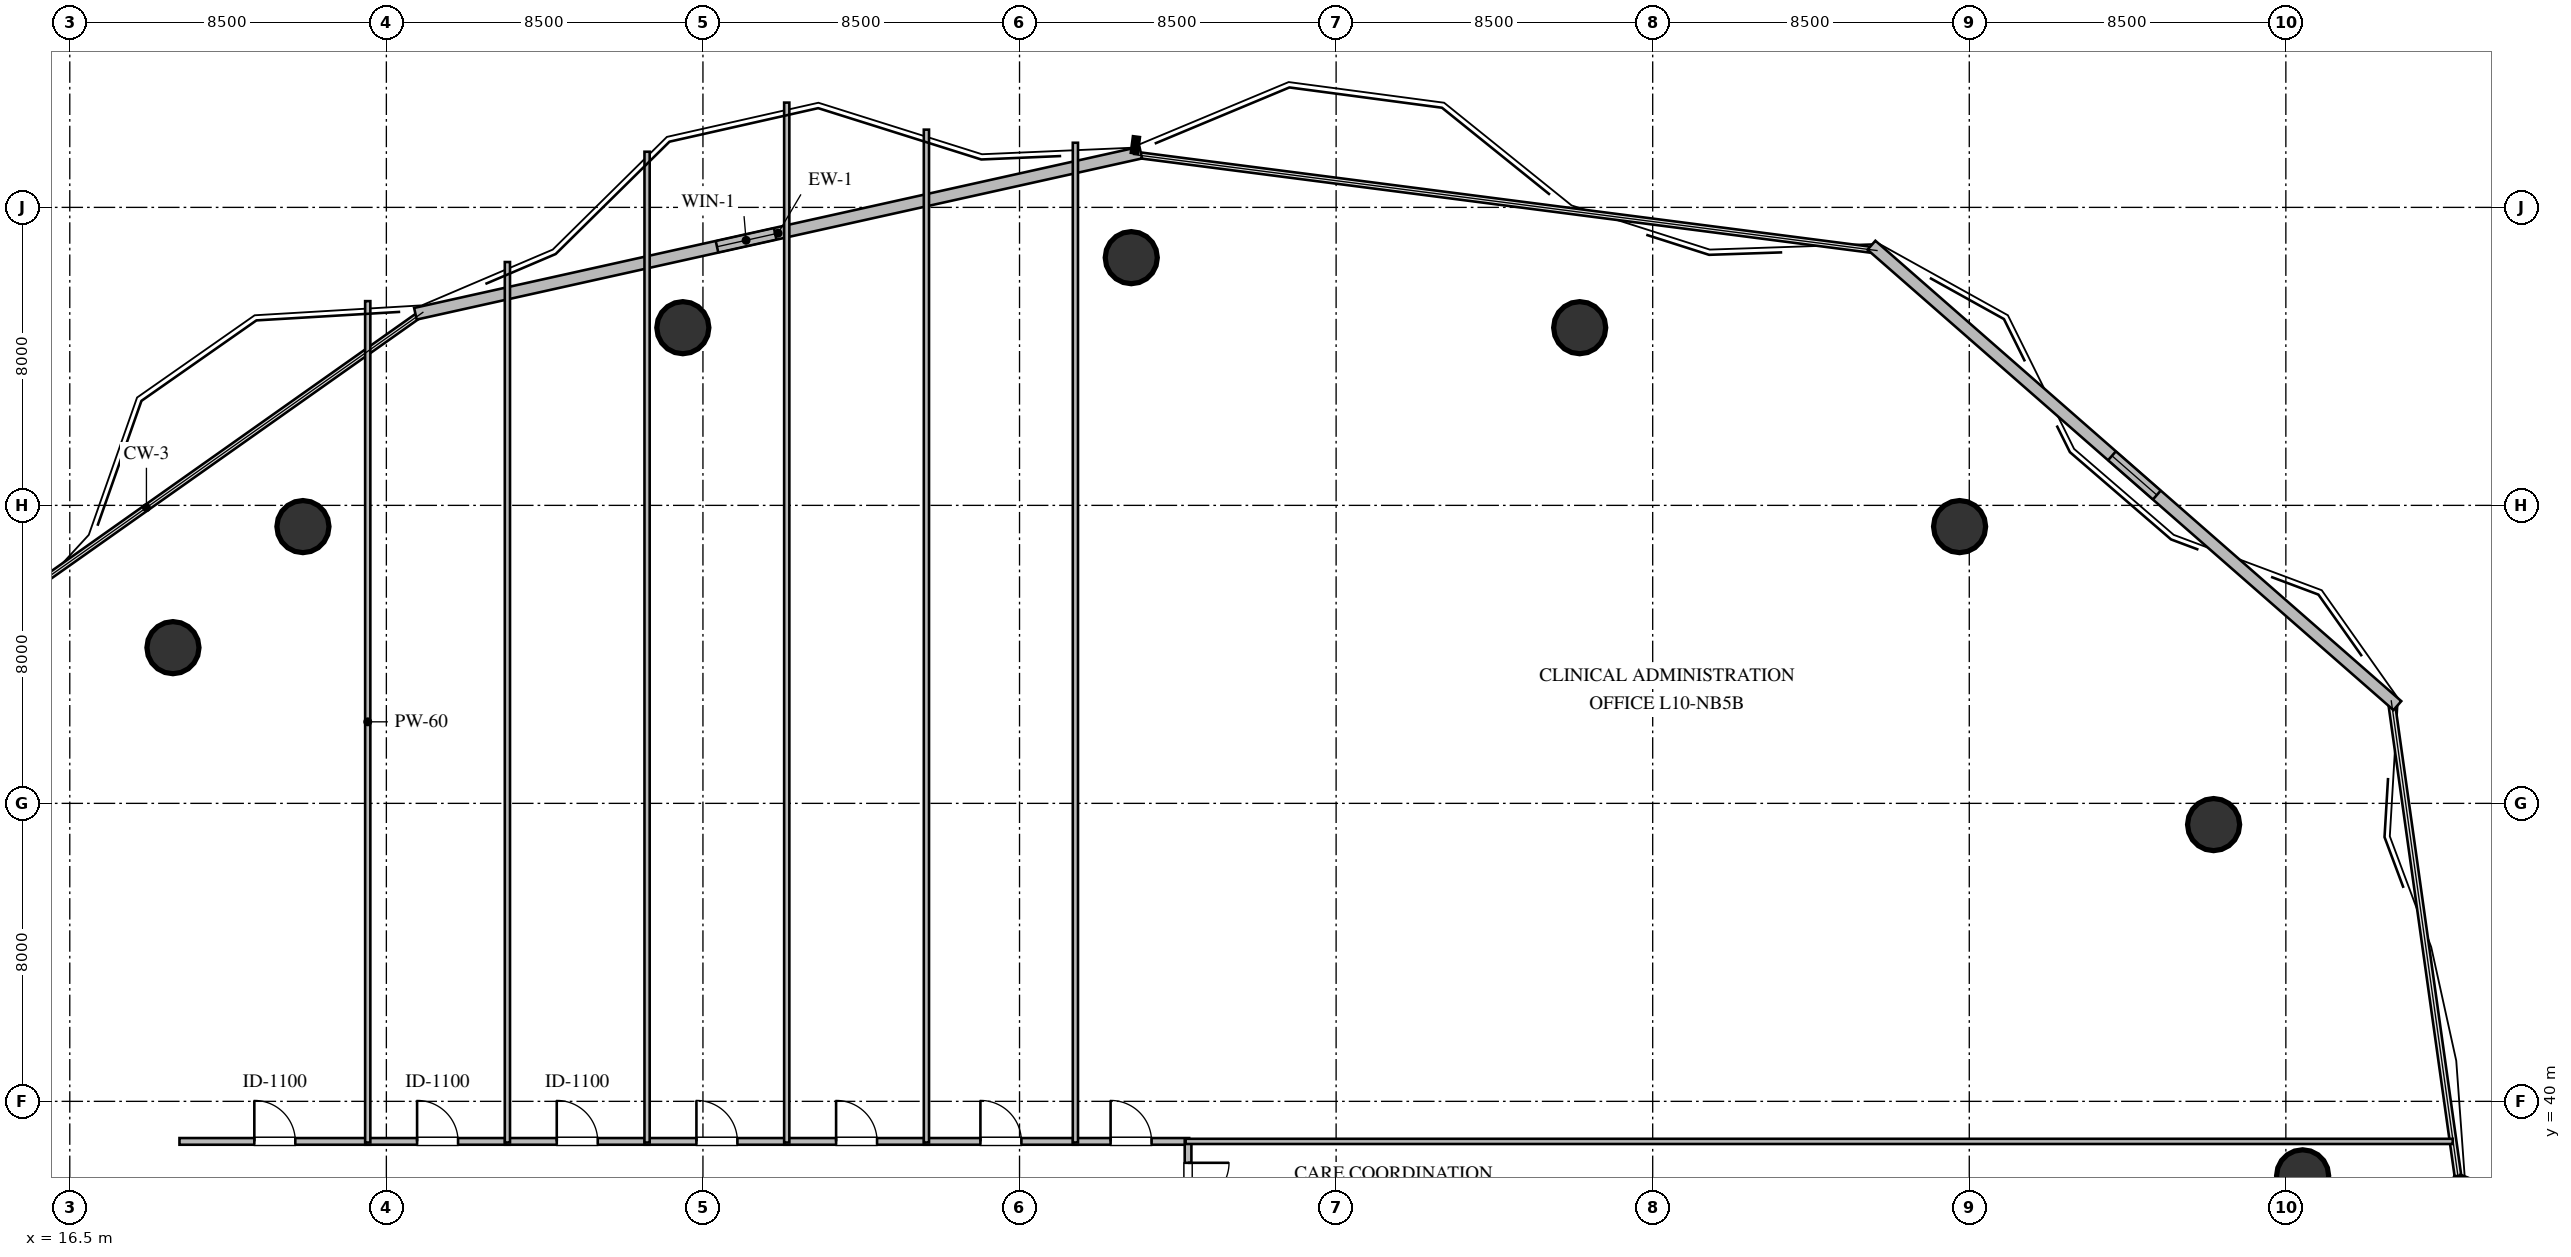
"""IFC4 building model, lengths in metres.
Left out: names, types, materials, properties, quantities, classifications, styles, units other than length and angle.
Written with IfcOpenShell. Run it as: python <this file> out.ifc"""

import sys

from ifc_helpers import new_model, si_unit, direction, frame, frame_2d, origin, origin_2d, place, context, subcontext, project, spatial, rectangle, circle, extrude, element, fill, save


model = new_model("IFC4")
c1 = context("Model", 3, precision=1e-05, world=origin(), true_north=direction((0.0, 1.0)))
c2 = subcontext(c1, "Body", "Model", "MODEL_VIEW")
j1 = project(units=[si_unit("LENGTHUNIT", "METRE"), si_unit("PLANEANGLEUNIT", "RADIAN")], contexts=[c1])
p1 = place(None, origin())
s1 = spatial("IfcSite", under=j1, at=p1, CompositionType="ELEMENT")
p2 = place(p1, origin())
s2 = spatial("IfcBuilding", under=s1, at=p2, CompositionType="ELEMENT")
p3 = place(p2, frame((0.0, 0.0, 42.0)))
s3 = spatial("IfcBuildingStorey", under=s2, at=p3, CompositionType="ELEMENT", Elevation=42.0)
for number, where, z_axis, x_axis in (
    (1, (76.45, 38.0, 0.0), (0.0, 0.0, 1.0), (1.0, 0.0, 0.0)),
    (2, (74.06, 47.43, 0.0), (0.0, 0.0, 1.0), (1.0, 0.0, 0.0)),
    (3, (67.24, 55.43, 0.0), (0.0, 0.0, 1.0), (1.0, 0.0, 0.0)),
    (4, (57.04, 60.77, 0.0), (0.0, 0.0, 1.0), (1.0, 0.0, 0.0)),
    (5, (45.0, 62.65, 0.0), (0.0, 0.0, 1.0), (1.0, 0.0, 0.0)),
    (6, (32.96, 60.77, 0.0), (0.0, 0.0, 1.0), (1.0, 0.0, 0.0)),
    (7, (22.76, 55.43, 0.0), (0.0, 0.0, 1.0), (1.0, 0.0, 0.0)),
    (8, (19.27, 52.18, 0.0), (0.0, 0.0, 1.0), (1.0, 0.0, 0.0)),
):
    element("IfcColumn", number, at=place(p3, frame(where, z_axis=z_axis, x_axis=x_axis)), inside=s3, PredefinedType="COLUMN", context=c2, shape_type="SweptSolid", body=[
        extrude(circle(Radius=0.7, at=origin_2d()), origin(), (0.0, 0.0, 1.0), 3.6),
    ])
p4 = place(p3, frame((25.78, 61.144, 0.0), z_axis=(0.0, 0.0, 1.0), x_axis=(0.976206349039, 0.216843639742, 0.0)))
e9 = element("IfcWall", 9, at=p4, inside=s3, PredefinedType="STANDARD", context=c2, shape_type="SweptSolid", body=[
    extrude(rectangle(XDim=19.949, YDim=0.32, at=frame_2d((9.975, 0.0))), origin(), (0.0, 0.0, 1.0), 3.36),
])
p5 = place(p4, frame((8.295, 0.0, 1.05)))
e10 = element("IfcOpeningElement", 10, at=p5, cuts=e9, PredefinedType="OPENING", context=c2, shape_type="SweptSolid", body=[
    extrude(rectangle(XDim=1.6, YDim=1.5, at=frame_2d((0.8, 0.75))), frame((0.0, 0.17, 0.0), z_axis=(0.0, -1.0, 0.0), x_axis=(1.0, 0.0, 0.0)), (0.0, 0.0, 1.0), 0.34),
])
p6 = place(p3, frame((64.874, 62.984, 0.0), z_axis=(0.0, 0.0, 1.0), x_axis=(0.752445311183, -0.658654730249, 0.0)))
e11 = element("IfcWall", 11, at=p6, inside=s3, PredefinedType="STANDARD", context=c2, shape_type="SweptSolid", body=[
    extrude(rectangle(XDim=18.765, YDim=0.32, at=frame_2d((9.383, 0.0))), origin(), (0.0, 0.0, 1.0), 3.36),
])
p7 = place(p6, frame((8.582, 0.0, 1.05)))
e12 = element("IfcOpeningElement", 12, at=p7, cuts=e11, PredefinedType="OPENING", context=c2, shape_type="SweptSolid", body=[
    extrude(rectangle(XDim=1.6, YDim=1.5, at=frame_2d((0.8, 0.75))), frame((0.0, 0.17, 0.0), z_axis=(0.0, -1.0, 0.0), x_axis=(1.0, 0.0, 0.0)), (0.0, 0.0, 1.0), 0.34),
])
p8 = place(p3, frame((19.445, 38.925, 0.0), z_axis=(0.0, 0.0, 1.0), x_axis=(1.0, 0.0, 0.0)))
e13 = element("IfcWall", 13, at=p8, inside=s3, PredefinedType="PARTITIONING", context=c2, shape_type="SweptSolid", body=[
    extrude(rectangle(XDim=5.12, YDim=0.18, at=frame_2d((2.56, 0.0))), origin(), (0.0, 0.0, 1.0), 3.36),
])
p9 = place(p8, frame((2.01, 0.0, 0.0)))
e14 = element("IfcOpeningElement", 14, at=p9, cuts=e13, PredefinedType="OPENING", context=c2, shape_type="SweptSolid", body=[
    extrude(rectangle(XDim=1.1, YDim=2.1, at=frame_2d((0.55, 1.05))), frame((0.0, 0.1, 0.0), z_axis=(0.0, -1.0, 0.0), x_axis=(1.0, 0.0, 0.0)), (0.0, 0.0, 1.0), 0.2),
])
p10 = place(p3, frame((24.435, 38.925, 0.0), z_axis=(0.0, 0.0, 1.0), x_axis=(1.0, 0.0, 0.0)))
e15 = element("IfcWall", 15, at=p10, inside=s3, PredefinedType="PARTITIONING", context=c2, shape_type="SweptSolid", body=[
    extrude(rectangle(XDim=3.88, YDim=0.18, at=frame_2d((1.94, 0.0))), origin(), (0.0, 0.0, 1.0), 3.36),
])
p11 = place(p10, frame((1.39, 0.0, 0.0)))
e16 = element("IfcOpeningElement", 16, at=p11, cuts=e15, PredefinedType="OPENING", context=c2, shape_type="SweptSolid", body=[
    extrude(rectangle(XDim=1.1, YDim=2.1, at=frame_2d((0.55, 1.05))), frame((0.0, 0.1, 0.0), z_axis=(0.0, -1.0, 0.0), x_axis=(1.0, 0.0, 0.0)), (0.0, 0.0, 1.0), 0.2),
])
p12 = place(p3, frame((28.185, 38.925, 0.0), z_axis=(0.0, 0.0, 1.0), x_axis=(1.0, 0.0, 0.0)))
e17 = element("IfcWall", 17, at=p12, inside=s3, PredefinedType="PARTITIONING", context=c2, shape_type="SweptSolid", body=[
    extrude(rectangle(XDim=3.88, YDim=0.18, at=frame_2d((1.94, 0.0))), origin(), (0.0, 0.0, 1.0), 3.36),
])
p13 = place(p12, frame((1.39, 0.0, 0.0)))
e18 = element("IfcOpeningElement", 18, at=p13, cuts=e17, PredefinedType="OPENING", context=c2, shape_type="SweptSolid", body=[
    extrude(rectangle(XDim=1.1, YDim=2.1, at=frame_2d((0.55, 1.05))), frame((0.0, 0.1, 0.0), z_axis=(0.0, -1.0, 0.0), x_axis=(1.0, 0.0, 0.0)), (0.0, 0.0, 1.0), 0.2),
])
p14 = place(p3, frame((31.935, 38.925, 0.0), z_axis=(0.0, 0.0, 1.0), x_axis=(1.0, 0.0, 0.0)))
e19 = element("IfcWall", 19, at=p14, inside=s3, PredefinedType="PARTITIONING", context=c2, shape_type="SweptSolid", body=[
    extrude(rectangle(XDim=3.88, YDim=0.18, at=frame_2d((1.94, 0.0))), origin(), (0.0, 0.0, 1.0), 3.36),
])
p15 = place(p14, frame((1.39, 0.0, 0.0)))
e20 = element("IfcOpeningElement", 20, at=p15, cuts=e19, PredefinedType="OPENING", context=c2, shape_type="SweptSolid", body=[
    extrude(rectangle(XDim=1.1, YDim=2.1, at=frame_2d((0.55, 1.05))), frame((0.0, 0.1, 0.0), z_axis=(0.0, -1.0, 0.0), x_axis=(1.0, 0.0, 0.0)), (0.0, 0.0, 1.0), 0.2),
])
p16 = place(p3, frame((35.685, 38.925, 0.0), z_axis=(0.0, 0.0, 1.0), x_axis=(1.0, 0.0, 0.0)))
e21 = element("IfcWall", 21, at=p16, inside=s3, PredefinedType="PARTITIONING", context=c2, shape_type="SweptSolid", body=[
    extrude(rectangle(XDim=3.88, YDim=0.18, at=frame_2d((1.94, 0.0))), origin(), (0.0, 0.0, 1.0), 3.36),
])
p17 = place(p16, frame((1.39, 0.0, 0.0)))
e22 = element("IfcOpeningElement", 22, at=p17, cuts=e21, PredefinedType="OPENING", context=c2, shape_type="SweptSolid", body=[
    extrude(rectangle(XDim=1.1, YDim=2.1, at=frame_2d((0.55, 1.05))), frame((0.0, 0.1, 0.0), z_axis=(0.0, -1.0, 0.0), x_axis=(1.0, 0.0, 0.0)), (0.0, 0.0, 1.0), 0.2),
])
p18 = place(p3, frame((39.435, 38.925, 0.0), z_axis=(0.0, 0.0, 1.0), x_axis=(1.0, 0.0, 0.0)))
e23 = element("IfcWall", 23, at=p18, inside=s3, PredefinedType="PARTITIONING", context=c2, shape_type="SweptSolid", body=[
    extrude(rectangle(XDim=4.13, YDim=0.18, at=frame_2d((2.065, 0.0))), origin(), (0.0, 0.0, 1.0), 3.36),
])
p19 = place(p18, frame((1.515, 0.0, 0.0)))
e24 = element("IfcOpeningElement", 24, at=p19, cuts=e23, PredefinedType="OPENING", context=c2, shape_type="SweptSolid", body=[
    extrude(rectangle(XDim=1.1, YDim=2.1, at=frame_2d((0.55, 1.05))), frame((0.0, 0.1, 0.0), z_axis=(0.0, -1.0, 0.0), x_axis=(1.0, 0.0, 0.0)), (0.0, 0.0, 1.0), 0.2),
])
p20 = place(p3, frame((43.435, 38.925, 0.0), z_axis=(0.0, 0.0, 1.0), x_axis=(1.0, 0.0, 0.0)))
e25 = element("IfcWall", 25, at=p20, inside=s3, PredefinedType="PARTITIONING", context=c2, shape_type="SweptSolid", body=[
    extrude(rectangle(XDim=3.12, YDim=0.18, at=frame_2d((1.56, 0.0))), origin(), (0.0, 0.0, 1.0), 3.36),
])
p21 = place(p20, frame((1.01, 0.0, 0.0)))
e26 = element("IfcOpeningElement", 26, at=p21, cuts=e25, PredefinedType="OPENING", context=c2, shape_type="SweptSolid", body=[
    extrude(rectangle(XDim=1.1, YDim=2.1, at=frame_2d((0.55, 1.05))), frame((0.0, 0.1, 0.0), z_axis=(0.0, -1.0, 0.0), x_axis=(1.0, 0.0, 0.0)), (0.0, 0.0, 1.0), 0.2),
])
p22 = place(p3, frame((46.525, 38.955, 0.0), z_axis=(0.0, 0.0, 1.0), x_axis=(0.0, -1.0, 0.0)))
e27 = element("IfcWall", 27, at=p22, inside=s3, PredefinedType="PARTITIONING", context=c2, shape_type="SweptSolid", body=[
    extrude(rectangle(XDim=2.31, YDim=0.18, at=frame_2d((1.155, 0.0))), origin(), (0.0, 0.0, 1.0), 3.36),
])
p23 = place(p22, frame((0.605, 0.0, 0.0)))
e28 = element("IfcOpeningElement", 28, at=p23, cuts=e27, PredefinedType="OPENING", context=c2, shape_type="SweptSolid", body=[
    extrude(rectangle(XDim=1.1, YDim=2.1, at=frame_2d((0.55, 1.05))), frame((0.0, 0.1, 0.0), z_axis=(0.0, -1.0, 0.0), x_axis=(1.0, 0.0, 0.0)), (0.0, 0.0, 1.0), 0.2),
])
p24 = place(p3, frame((24.5, 61.483, 0.0), z_axis=(0.0, 0.0, 1.0), x_axis=(0.0, -1.0, 0.0)))
e29 = element("IfcWall", 29, at=p24, inside=s3, PredefinedType="PARTITIONING", context=c2, shape_type="SweptSolid", body=[
    extrude(rectangle(XDim=22.588, YDim=0.14, at=frame_2d((11.294, 0.0))), origin(), (0.0, 0.0, 1.0), 3.36),
])
p25 = place(p3, frame((28.25, 62.533, 0.0), z_axis=(0.0, 0.0, 1.0), x_axis=(0.0, -1.0, 0.0)))
e30 = element("IfcWall", 30, at=p25, inside=s3, PredefinedType="PARTITIONING", context=c2, shape_type="SweptSolid", body=[
    extrude(rectangle(XDim=23.638, YDim=0.14, at=frame_2d((11.819, 0.0))), origin(), (0.0, 0.0, 1.0), 3.36),
])
p26 = place(p3, frame((32.0, 65.494, 0.0), z_axis=(0.0, 0.0, 1.0), x_axis=(0.0, -1.0, 0.0)))
e31 = element("IfcWall", 31, at=p26, inside=s3, PredefinedType="PARTITIONING", context=c2, shape_type="SweptSolid", body=[
    extrude(rectangle(XDim=26.599, YDim=0.14, at=frame_2d((13.299, 0.0))), origin(), (0.0, 0.0, 1.0), 2.806),
])
p27 = place(p3, frame((35.75, 66.813, 0.0), z_axis=(0.0, 0.0, 1.0), x_axis=(0.0, -1.0, 0.0)))
e32 = element("IfcWall", 32, at=p27, inside=s3, PredefinedType="PARTITIONING", context=c2, shape_type="SweptSolid", body=[
    extrude(rectangle(XDim=27.918, YDim=0.14, at=frame_2d((13.959, 0.0))), origin(), (0.0, 0.0, 1.0), 3.36),
])
p28 = place(p3, frame((39.5, 66.087, 0.0), z_axis=(0.0, 0.0, 1.0), x_axis=(0.0, -1.0, 0.0)))
e33 = element("IfcWall", 33, at=p28, inside=s3, PredefinedType="PARTITIONING", context=c2, shape_type="SweptSolid", body=[
    extrude(rectangle(XDim=27.192, YDim=0.14, at=frame_2d((13.596, 0.0))), origin(), (0.0, 0.0, 1.0), 3.36),
])
p29 = place(p3, frame((43.5, 65.735, 0.0), z_axis=(0.0, 0.0, 1.0), x_axis=(0.0, -1.0, 0.0)))
e34 = element("IfcWall", 34, at=p29, inside=s3, PredefinedType="PARTITIONING", context=c2, shape_type="SweptSolid", body=[
    extrude(rectangle(XDim=26.84, YDim=0.14, at=frame_2d((13.42, 0.0))), origin(), (0.0, 0.0, 1.0), 2.806),
])
p30 = place(p3, frame((80.48, 38.925, 0.0), z_axis=(0.0, 0.0, 1.0), x_axis=(-1.0, 0.0, 0.0)))
e35 = element("IfcWall", 35, at=p30, inside=s3, PredefinedType="PARTITIONING", context=c2, shape_type="SweptSolid", body=[
    extrude(rectangle(XDim=34.02, YDim=0.14, at=frame_2d((17.01, 0.0))), origin(), (0.0, 0.0, 1.0), 3.36),
])
p31 = place(p5, origin())
e36 = element("IfcWindow", 36, at=p31, inside=s3, PartitioningType="SINGLE_PANEL", PredefinedType="WINDOW", context=c2, shape_type="SweptSolid", body=[
    extrude(rectangle(XDim=1.6, YDim=1.5, at=frame_2d((0.8, 0.75))), frame((0.0, 0.03, 0.0), z_axis=(0.0, -1.0, 0.0), x_axis=(1.0, 0.0, 0.0)), (0.0, 0.0, 1.0), 0.06),
])
fill(e10, e36)
p32 = place(p7, origin())
e37 = element("IfcWindow", 37, at=p32, inside=s3, PartitioningType="SINGLE_PANEL", PredefinedType="WINDOW", context=c2, shape_type="SweptSolid", body=[
    extrude(rectangle(XDim=1.6, YDim=1.5, at=frame_2d((0.8, 0.75))), frame((0.0, 0.03, 0.0), z_axis=(0.0, -1.0, 0.0), x_axis=(1.0, 0.0, 0.0)), (0.0, 0.0, 1.0), 0.06),
])
fill(e12, e37)
p33 = place(p9, origin())
e38 = element("IfcDoor", 38, at=p33, inside=s3, OperationType="SINGLE_SWING_LEFT", PredefinedType="DOOR", context=c2, shape_type="SweptSolid", body=[
    extrude(rectangle(XDim=1.1, YDim=2.1, at=frame_2d((0.55, 1.05))), frame((0.0, 0.025, 0.0), z_axis=(0.0, -1.0, 0.0), x_axis=(1.0, 0.0, 0.0)), (0.0, 0.0, 1.0), 0.05),
])
fill(e14, e38)
p34 = place(p11, origin())
e39 = element("IfcDoor", 39, at=p34, inside=s3, OperationType="SINGLE_SWING_LEFT", PredefinedType="DOOR", context=c2, shape_type="SweptSolid", body=[
    extrude(rectangle(XDim=1.1, YDim=2.1, at=frame_2d((0.55, 1.05))), frame((0.0, 0.025, 0.0), z_axis=(0.0, -1.0, 0.0), x_axis=(1.0, 0.0, 0.0)), (0.0, 0.0, 1.0), 0.05),
])
fill(e16, e39)
p35 = place(p13, origin())
e40 = element("IfcDoor", 40, at=p35, inside=s3, OperationType="SINGLE_SWING_LEFT", PredefinedType="DOOR", context=c2, shape_type="SweptSolid", body=[
    extrude(rectangle(XDim=1.1, YDim=2.1, at=frame_2d((0.55, 1.05))), frame((0.0, 0.025, 0.0), z_axis=(0.0, -1.0, 0.0), x_axis=(1.0, 0.0, 0.0)), (0.0, 0.0, 1.0), 0.05),
])
fill(e18, e40)
p36 = place(p15, origin())
e41 = element("IfcDoor", 41, at=p36, inside=s3, OperationType="SINGLE_SWING_LEFT", PredefinedType="DOOR", context=c2, shape_type="SweptSolid", body=[
    extrude(rectangle(XDim=1.1, YDim=2.1, at=frame_2d((0.55, 1.05))), frame((0.0, 0.025, 0.0), z_axis=(0.0, -1.0, 0.0), x_axis=(1.0, 0.0, 0.0)), (0.0, 0.0, 1.0), 0.05),
])
fill(e20, e41)
p37 = place(p17, origin())
e42 = element("IfcDoor", 42, at=p37, inside=s3, OperationType="SINGLE_SWING_LEFT", PredefinedType="DOOR", context=c2, shape_type="SweptSolid", body=[
    extrude(rectangle(XDim=1.1, YDim=2.1, at=frame_2d((0.55, 1.05))), frame((0.0, 0.025, 0.0), z_axis=(0.0, -1.0, 0.0), x_axis=(1.0, 0.0, 0.0)), (0.0, 0.0, 1.0), 0.05),
])
fill(e22, e42)
p38 = place(p19, origin())
e43 = element("IfcDoor", 43, at=p38, inside=s3, OperationType="SINGLE_SWING_LEFT", PredefinedType="DOOR", context=c2, shape_type="SweptSolid", body=[
    extrude(rectangle(XDim=1.1, YDim=2.1, at=frame_2d((0.55, 1.05))), frame((0.0, 0.025, 0.0), z_axis=(0.0, -1.0, 0.0), x_axis=(1.0, 0.0, 0.0)), (0.0, 0.0, 1.0), 0.05),
])
fill(e24, e43)
p39 = place(p21, origin())
e44 = element("IfcDoor", 44, at=p39, inside=s3, OperationType="SINGLE_SWING_LEFT", PredefinedType="DOOR", context=c2, shape_type="SweptSolid", body=[
    extrude(rectangle(XDim=1.1, YDim=2.1, at=frame_2d((0.55, 1.05))), frame((0.0, 0.025, 0.0), z_axis=(0.0, -1.0, 0.0), x_axis=(1.0, 0.0, 0.0)), (0.0, 0.0, 1.0), 0.05),
])
fill(e26, e44)
p40 = place(p23, origin())
e45 = element("IfcDoor", 45, at=p40, inside=s3, OperationType="SINGLE_SWING_LEFT", PredefinedType="DOOR", context=c2, shape_type="SweptSolid", body=[
    extrude(rectangle(XDim=1.1, YDim=2.1, at=frame_2d((0.55, 1.05))), frame((0.0, 0.025, 0.0), z_axis=(0.0, -1.0, 0.0), x_axis=(1.0, 0.0, 0.0)), (0.0, 0.0, 1.0), 0.05),
])
fill(e28, e45)
save(model, sys.argv[1])
